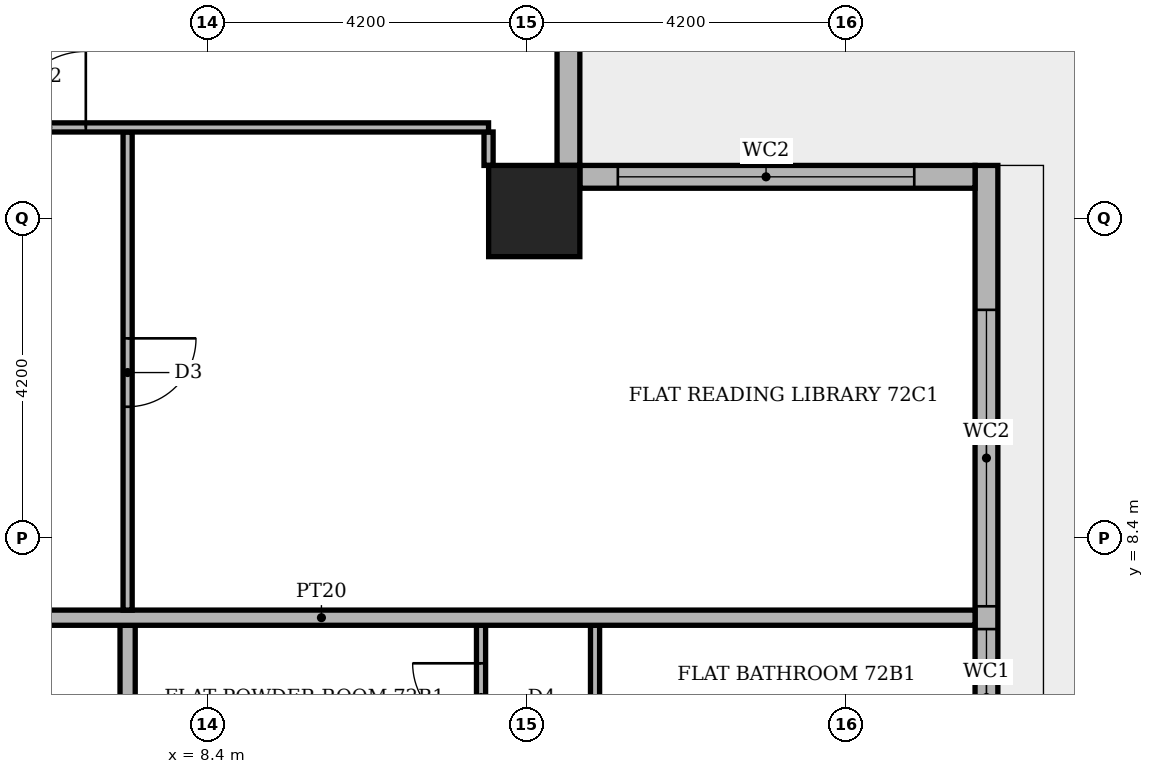
"""IFC4 building model, lengths in metres.
Left out: names, types, materials, properties, quantities, classifications, styles, units other than length and angle.
Written with IfcOpenShell. Run it as: python <this file> out.ifc"""

import sys

from ifc_helpers import new_model, si_unit, direction, frame, frame_2d, origin, origin_2d, place, context, subcontext, project, spatial, rectangle, extrude, element, fill, save


model = new_model("IFC4")
c1 = context("Model", 3, precision=1e-05, world=origin(), true_north=direction((0.0, 1.0)))
c2 = subcontext(c1, "Body", "Model", "MODEL_VIEW")
j1 = project(units=[si_unit("LENGTHUNIT", "METRE"), si_unit("PLANEANGLEUNIT", "RADIAN")], contexts=[c1])
p1 = place(None, origin())
s1 = spatial("IfcSite", under=j1, at=p1, CompositionType="ELEMENT")
p2 = place(p1, origin())
s2 = spatial("IfcBuilding", under=s1, at=p2, CompositionType="ELEMENT")
p3 = place(p2, frame((0.0, 0.0, 300.6)))
s3 = spatial("IfcBuildingStorey", under=s2, at=p3, CompositionType="ELEMENT", Elevation=300.6)
p4 = place(p3, frame((12.7, 12.7, -0.35), z_axis=(0.0, 0.0, 1.0), x_axis=(1.0, 0.0, 0.0)))
e1 = element("IfcColumn", 1, at=p4, inside=s3, PredefinedType="COLUMN", context=c2, shape_type="SweptSolid", body=[
    extrude(rectangle(XDim=1.2, YDim=1.2, at=origin_2d()), origin(), (0.0, 0.0, 1.0), 4.25),
])
p5 = place(p3, frame((18.65, -13.0, 0.0), z_axis=(0.0, 0.0, 1.0), x_axis=(0.0, 1.0, 0.0)))
e2 = element("IfcWall", 2, at=p5, inside=s3, PredefinedType="STANDARD", context=c2, shape_type="SweptSolid", body=[
    extrude(rectangle(XDim=26.3, YDim=0.3, at=frame_2d((13.15, 0.0))), origin(), (0.0, 0.0, 1.0), 3.55),
])
p6 = place(p5, frame((1.6, 0.0, 0.6)))
e3 = element("IfcOpeningElement", 3, at=p6, cuts=e2, PredefinedType="OPENING", context=c2, shape_type="SweptSolid", body=[
    extrude(rectangle(XDim=1.8, YDim=2.4, at=frame_2d((0.9, 1.2))), frame((0.0, 0.16, 0.0), z_axis=(0.0, -1.0, 0.0), x_axis=(1.0, 0.0, 0.0)), (0.0, 0.0, 1.0), 0.32),
])
p7 = place(p5, frame((3.7, 0.0, 0.0)))
e4 = element("IfcOpeningElement", 4, at=p7, cuts=e2, PredefinedType="OPENING", context=c2, shape_type="SweptSolid", body=[
    extrude(rectangle(XDim=3.9, YDim=2.4, at=frame_2d((1.95, 1.2))), frame((0.0, 0.16, 0.0), z_axis=(0.0, -1.0, 0.0), x_axis=(1.0, 0.0, 0.0)), (0.0, 0.0, 1.0), 0.32),
])
p8 = place(p5, frame((7.9, 0.0, 0.0)))
e5 = element("IfcOpeningElement", 5, at=p8, cuts=e2, PredefinedType="OPENING", context=c2, shape_type="SweptSolid", body=[
    extrude(rectangle(XDim=1.8, YDim=2.4, at=frame_2d((0.9, 1.2))), frame((0.0, 0.16, 0.0), z_axis=(0.0, -1.0, 0.0), x_axis=(1.0, 0.0, 0.0)), (0.0, 0.0, 1.0), 0.32),
])
p9 = place(p5, frame((10.0, 0.0, 0.6)))
e6 = element("IfcOpeningElement", 6, at=p9, cuts=e2, PredefinedType="OPENING", context=c2, shape_type="SweptSolid", body=[
    extrude(rectangle(XDim=1.8, YDim=2.4, at=frame_2d((0.9, 1.2))), frame((0.0, 0.16, 0.0), z_axis=(0.0, -1.0, 0.0), x_axis=(1.0, 0.0, 0.0)), (0.0, 0.0, 1.0), 0.32),
])
p10 = place(p5, frame((14.2, 0.0, 0.0)))
e7 = element("IfcOpeningElement", 7, at=p10, cuts=e2, PredefinedType="OPENING", context=c2, shape_type="SweptSolid", body=[
    extrude(rectangle(XDim=1.8, YDim=2.4, at=frame_2d((0.9, 1.2))), frame((0.0, 0.16, 0.0), z_axis=(0.0, -1.0, 0.0), x_axis=(1.0, 0.0, 0.0)), (0.0, 0.0, 1.0), 0.32),
])
p11 = place(p5, frame((16.3, 0.0, 0.6)))
e8 = element("IfcOpeningElement", 8, at=p11, cuts=e2, PredefinedType="OPENING", context=c2, shape_type="SweptSolid", body=[
    extrude(rectangle(XDim=1.8, YDim=2.4, at=frame_2d((0.9, 1.2))), frame((0.0, 0.16, 0.0), z_axis=(0.0, -1.0, 0.0), x_axis=(1.0, 0.0, 0.0)), (0.0, 0.0, 1.0), 0.32),
])
p12 = place(p5, frame((18.4, 0.0, 0.6)))
e9 = element("IfcOpeningElement", 9, at=p12, cuts=e2, PredefinedType="OPENING", context=c2, shape_type="SweptSolid", body=[
    extrude(rectangle(XDim=1.8, YDim=2.4, at=frame_2d((0.9, 1.2))), frame((0.0, 0.16, 0.0), z_axis=(0.0, -1.0, 0.0), x_axis=(1.0, 0.0, 0.0)), (0.0, 0.0, 1.0), 0.32),
])
p13 = place(p5, frame((20.5, 0.0, 0.6)))
e10 = element("IfcOpeningElement", 10, at=p13, cuts=e2, PredefinedType="OPENING", context=c2, shape_type="SweptSolid", body=[
    extrude(rectangle(XDim=3.9, YDim=2.4, at=frame_2d((1.95, 1.2))), frame((0.0, 0.16, 0.0), z_axis=(0.0, -1.0, 0.0), x_axis=(1.0, 0.0, 0.0)), (0.0, 0.0, 1.0), 0.32),
])
p14 = place(p5, frame((12.175, 0.0, 0.9)))
e11 = element("IfcOpeningElement", 11, at=p14, cuts=e2, PredefinedType="OPENING", context=c2, shape_type="SweptSolid", body=[
    extrude(rectangle(XDim=1.2, YDim=2.1, at=frame_2d((0.6, 1.05))), frame((0.0, 0.16, 0.0), z_axis=(0.0, -1.0, 0.0), x_axis=(1.0, 0.0, 0.0)), (0.0, 0.0, 1.0), 0.32),
])
p15 = place(p3, frame((18.5, 13.15, 0.0), z_axis=(0.0, 0.0, 1.0), x_axis=(-1.0, 0.0, 0.0)))
e12 = element("IfcWall", 12, at=p15, inside=s3, PredefinedType="STANDARD", context=c2, shape_type="SweptSolid", body=[
    extrude(rectangle(XDim=5.2, YDim=0.3, at=frame_2d((2.6, 0.0))), origin(), (0.0, 0.0, 1.0), 3.55),
])
p16 = place(p15, frame((0.8, 0.0, 0.6)))
e13 = element("IfcOpeningElement", 13, at=p16, cuts=e12, PredefinedType="OPENING", context=c2, shape_type="SweptSolid", body=[
    extrude(rectangle(XDim=3.9, YDim=2.4, at=frame_2d((1.95, 1.2))), frame((0.0, 0.16, 0.0), z_axis=(0.0, -1.0, 0.0), x_axis=(1.0, 0.0, 0.0)), (0.0, 0.0, 1.0), 0.32),
])
p17 = place(p3, frame((13.15, 13.3, 0.0), z_axis=(0.0, 0.0, 1.0), x_axis=(0.0, 1.0, 0.0)))
e14 = element("IfcWall", 14, at=p17, inside=s3, PredefinedType="STANDARD", context=c2, shape_type="SweptSolid", body=[
    extrude(rectangle(XDim=5.5, YDim=0.3, at=frame_2d((2.75, 0.0))), origin(), (0.0, 0.0, 1.0), 3.55),
])
p18 = place(p17, frame((2.6, 0.0, 0.0)))
e15 = element("IfcOpeningElement", 15, at=p18, cuts=e14, PredefinedType="OPENING", context=c2, shape_type="SweptSolid", body=[
    extrude(rectangle(XDim=1.8, YDim=2.4, at=frame_2d((0.9, 1.2))), frame((0.0, 0.16, 0.0), z_axis=(0.0, -1.0, 0.0), x_axis=(1.0, 0.0, 0.0)), (0.0, 0.0, 1.0), 0.32),
])
p19 = place(p3, frame((7.35, -7.25, 0.0), z_axis=(0.0, 0.0, 1.0), x_axis=(0.0, 1.0, 0.0)))
e16 = element("IfcWall", 16, at=p19, inside=s3, PredefinedType="PARTITIONING", context=c2, shape_type="SweptSolid", body=[
    extrude(rectangle(XDim=14.5, YDim=0.2, at=frame_2d((7.25, 0.0))), origin(), (0.0, 0.0, 1.0), 3.55),
])
p20 = place(p19, frame((2.5, 0.0, 0.0)))
e17 = element("IfcOpeningElement", 17, at=p20, cuts=e16, PredefinedType="OPENING", context=c2, shape_type="SweptSolid", body=[
    extrude(rectangle(XDim=1.1, YDim=2.4, at=frame_2d((0.55, 1.2))), frame((0.0, 0.11, 0.0), z_axis=(0.0, -1.0, 0.0), x_axis=(1.0, 0.0, 0.0)), (0.0, 0.0, 1.0), 0.22),
])
p21 = place(p3, frame((12.0, 5.31, 0.0), z_axis=(0.0, 0.0, 1.0), x_axis=(0.0, 1.0, 0.0)))
e18 = element("IfcWall", 18, at=p21, inside=s3, PredefinedType="PARTITIONING", context=c2, shape_type="SweptSolid", body=[
    extrude(rectangle(XDim=1.94, YDim=0.12, at=frame_2d((0.97, 0.0))), origin(), (0.0, 0.0, 1.0), 3.55),
])
p22 = place(p21, frame((0.54, 0.0, 0.0)))
e19 = element("IfcOpeningElement", 19, at=p22, cuts=e18, PredefinedType="OPENING", context=c2, shape_type="SweptSolid", body=[
    extrude(rectangle(XDim=0.9, YDim=2.1, at=frame_2d((0.45, 1.05))), frame((0.0, 0.07, 0.0), z_axis=(0.0, -1.0, 0.0), x_axis=(1.0, 0.0, 0.0)), (0.0, 0.0, 1.0), 0.14),
])
p23 = place(p3, frame((13.5, 5.31, 0.0), z_axis=(0.0, 0.0, 1.0), x_axis=(0.0, 1.0, 0.0)))
e20 = element("IfcWall", 20, at=p23, inside=s3, PredefinedType="PARTITIONING", context=c2, shape_type="SweptSolid", body=[
    extrude(rectangle(XDim=1.94, YDim=0.12, at=frame_2d((0.97, 0.0))), origin(), (0.0, 0.0, 1.0), 3.55),
])
p24 = place(p3, frame((1.3, 7.35, 0.0), z_axis=(0.0, 0.0, 1.0), x_axis=(1.0, 0.0, 0.0)))
e21 = element("IfcWall", 21, at=p24, inside=s3, PredefinedType="PARTITIONING", context=c2, shape_type="SweptSolid", body=[
    extrude(rectangle(XDim=17.2, YDim=0.2, at=frame_2d((8.6, 0.0))), origin(), (0.0, 0.0, 1.0), 3.55),
])
p25 = place(p24, frame((2.475, 0.0, 0.0)))
e22 = element("IfcOpeningElement", 22, at=p25, cuts=e21, PredefinedType="OPENING", context=c2, shape_type="SweptSolid", body=[
    extrude(rectangle(XDim=1.1, YDim=2.4, at=frame_2d((0.55, 1.2))), frame((0.0, 0.11, 0.0), z_axis=(0.0, -1.0, 0.0), x_axis=(1.0, 0.0, 0.0)), (0.0, 0.0, 1.0), 0.22),
])
p26 = place(p3, frame((7.35, 7.45, 0.0), z_axis=(0.0, 0.0, 1.0), x_axis=(0.0, 1.0, 0.0)))
e23 = element("IfcWall", 23, at=p26, inside=s3, PredefinedType="PARTITIONING", context=c2, shape_type="SweptSolid", body=[
    extrude(rectangle(XDim=6.29, YDim=0.12, at=frame_2d((3.145, 0.0))), origin(), (0.0, 0.0, 1.0), 3.55),
])
p27 = place(p26, frame((2.675, 0.0, 0.0)))
e24 = element("IfcOpeningElement", 24, at=p27, cuts=e23, PredefinedType="OPENING", context=c2, shape_type="SweptSolid", body=[
    extrude(rectangle(XDim=0.9, YDim=2.1, at=frame_2d((0.45, 1.05))), frame((0.0, 0.07, 0.0), z_axis=(0.0, -1.0, 0.0), x_axis=(1.0, 0.0, 0.0)), (0.0, 0.0, 1.0), 0.14),
])
p28 = place(p3, frame((12.099, 13.3, 0.0), z_axis=(0.0, 0.0, 1.0), x_axis=(0.0, 1.0, 0.0)))
e25 = element("IfcWall", 25, at=p28, inside=s3, PredefinedType="PARTITIONING", context=c2, shape_type="SweptSolid", body=[
    extrude(rectangle(XDim=0.44, YDim=0.12, at=frame_2d((0.22, 0.0))), origin(), (0.0, 0.0, 1.0), 3.55),
])
p29 = place(p3, frame((-7.25, 13.8, 0.0), z_axis=(0.0, 0.0, 1.0), x_axis=(1.0, 0.0, 0.0)))
e26 = element("IfcWall", 26, at=p29, inside=s3, PredefinedType="PARTITIONING", context=c2, shape_type="SweptSolid", body=[
    extrude(rectangle(XDim=19.349, YDim=0.12, at=frame_2d((9.675, 0.0))), origin(), (0.0, 0.0, 1.0), 3.55),
])
p30 = place(p29, frame((13.05, 0.0, 0.0)))
e27 = element("IfcOpeningElement", 27, at=p30, cuts=e26, PredefinedType="OPENING", context=c2, shape_type="SweptSolid", body=[
    extrude(rectangle(XDim=1.0, YDim=2.1, at=frame_2d((0.5, 1.05))), frame((0.0, 0.07, 0.0), z_axis=(0.0, -1.0, 0.0), x_axis=(1.0, 0.0, 0.0)), (0.0, 0.0, 1.0), 0.14),
])
p31 = place(p29, frame((7.85, 0.0, 0.0)))
e28 = element("IfcOpeningElement", 28, at=p31, cuts=e26, PredefinedType="OPENING", context=c2, shape_type="SweptSolid", body=[
    extrude(rectangle(XDim=0.9, YDim=2.1, at=frame_2d((0.45, 1.05))), frame((0.0, 0.07, 0.0), z_axis=(0.0, -1.0, 0.0), x_axis=(1.0, 0.0, 0.0)), (0.0, 0.0, 1.0), 0.14),
])
p32 = place(p12, origin())
e29 = element("IfcWindow", 29, at=p32, inside=s3, PartitioningType="SINGLE_PANEL", PredefinedType="WINDOW", context=c2, shape_type="SweptSolid", body=[
    extrude(rectangle(XDim=1.8, YDim=2.4, at=frame_2d((0.9, 1.2))), frame((0.0, 0.03, 0.0), z_axis=(0.0, -1.0, 0.0), x_axis=(1.0, 0.0, 0.0)), (0.0, 0.0, 1.0), 0.06),
])
fill(e9, e29)
p33 = place(p13, origin())
e30 = element("IfcWindow", 30, at=p33, inside=s3, PartitioningType="SINGLE_PANEL", PredefinedType="WINDOW", context=c2, shape_type="SweptSolid", body=[
    extrude(rectangle(XDim=3.9, YDim=2.4, at=frame_2d((1.95, 1.2))), frame((0.0, 0.03, 0.0), z_axis=(0.0, -1.0, 0.0), x_axis=(1.0, 0.0, 0.0)), (0.0, 0.0, 1.0), 0.06),
])
fill(e10, e30)
p34 = place(p16, origin())
e31 = element("IfcWindow", 31, at=p34, inside=s3, PartitioningType="SINGLE_PANEL", PredefinedType="WINDOW", context=c2, shape_type="SweptSolid", body=[
    extrude(rectangle(XDim=3.9, YDim=2.4, at=frame_2d((1.95, 1.2))), frame((0.0, 0.03, 0.0), z_axis=(0.0, -1.0, 0.0), x_axis=(1.0, 0.0, 0.0)), (0.0, 0.0, 1.0), 0.06),
])
fill(e13, e31)
p35 = place(p22, origin())
e32 = element("IfcDoor", 32, at=p35, inside=s3, OperationType="SINGLE_SWING_RIGHT", PredefinedType="DOOR", context=c2, shape_type="SweptSolid", body=[
    extrude(rectangle(XDim=0.9, YDim=2.1, at=frame_2d((0.45, 1.05))), frame((0.0, 0.025, 0.0), z_axis=(0.0, -1.0, 0.0), x_axis=(1.0, 0.0, 0.0)), (0.0, 0.0, 1.0), 0.05),
])
fill(e19, e32)
p36 = place(p27, frame((0.9, 0.0, 0.0), z_axis=(0.0, 0.0, 1.0), x_axis=(-1.0, 0.0, 0.0)))
e33 = element("IfcDoor", 33, at=p36, inside=s3, OperationType="SINGLE_SWING_RIGHT", PredefinedType="DOOR", context=c2, shape_type="SweptSolid", body=[
    extrude(rectangle(XDim=0.9, YDim=2.1, at=frame_2d((0.45, 1.05))), frame((0.0, 0.025, 0.0), z_axis=(0.0, -1.0, 0.0), x_axis=(1.0, 0.0, 0.0)), (0.0, 0.0, 1.0), 0.05),
])
fill(e24, e33)
p37 = place(p30, origin())
e34 = element("IfcDoor", 34, at=p37, inside=s3, OperationType="SINGLE_SWING_RIGHT", PredefinedType="DOOR", context=c2, shape_type="SweptSolid", body=[
    extrude(rectangle(XDim=1.0, YDim=2.1, at=frame_2d((0.5, 1.05))), frame((0.0, 0.025, 0.0), z_axis=(0.0, -1.0, 0.0), x_axis=(1.0, 0.0, 0.0)), (0.0, 0.0, 1.0), 0.05),
])
fill(e27, e34)
save(model, sys.argv[1])
